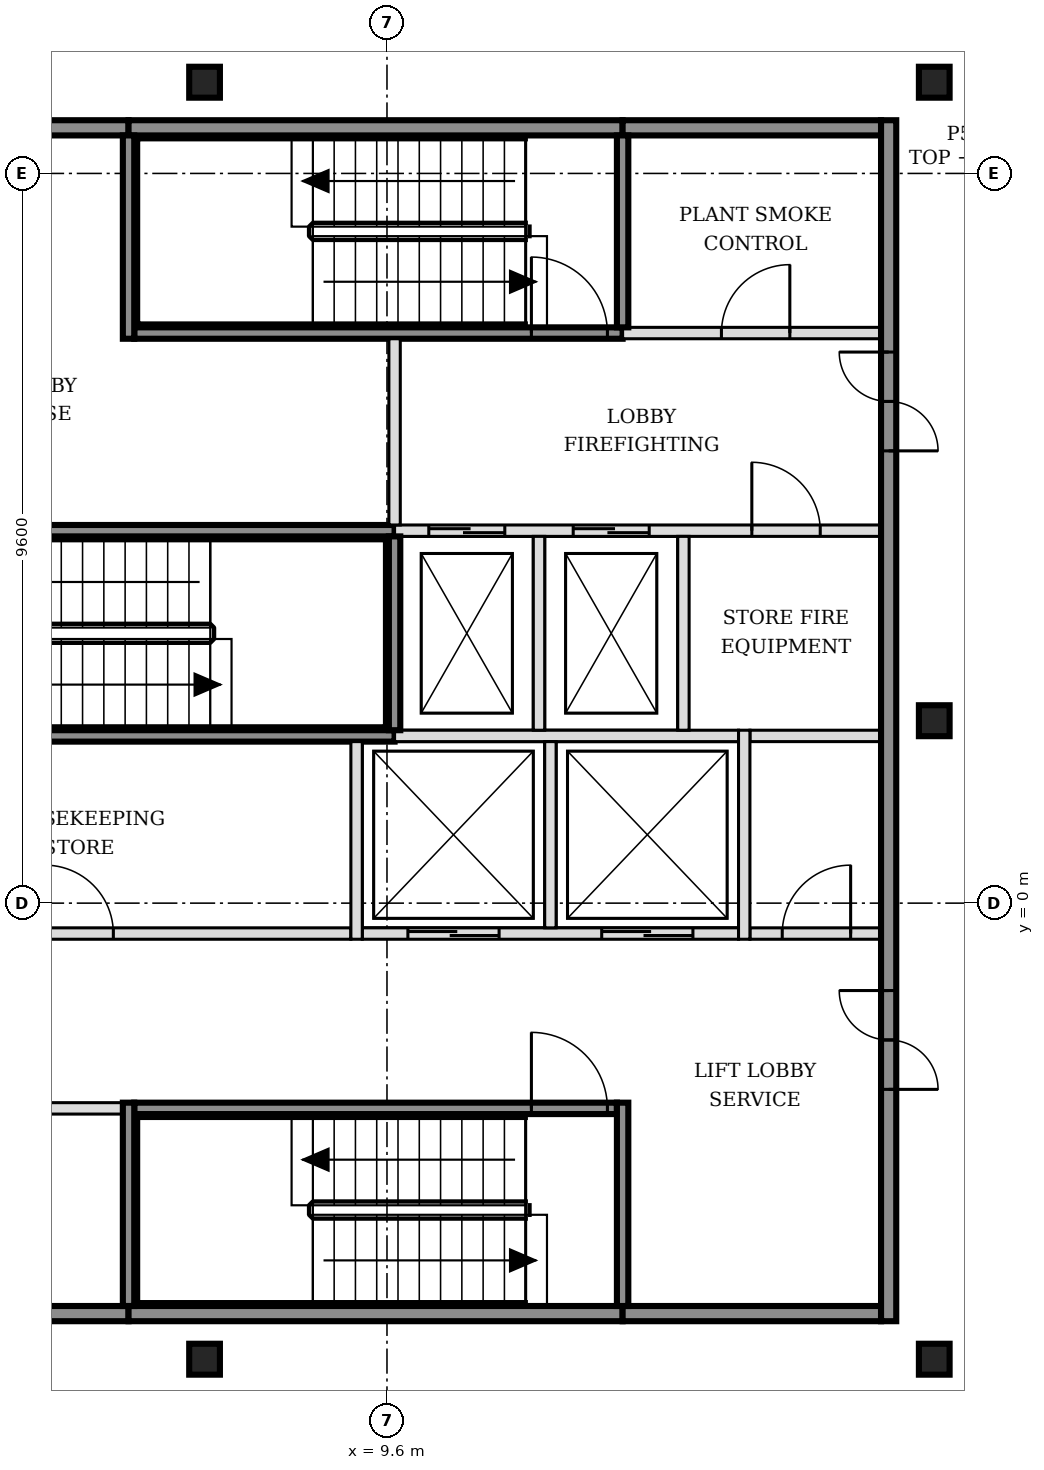
"""IFC4 building model, lengths in metres.
Left out: names, types, materials, properties, quantities, classifications, styles, units other than length and angle.
Written with IfcOpenShell. Run it as: python <this file> out.ifc"""

import sys

from ifc_helpers import new_model, si_unit, direction, frame, frame_2d, origin, origin_2d, place, context, subcontext, project, spatial, rectangle, i_section, extrude, element, fill, save


model = new_model("IFC4")
c1 = context("Model", 3, precision=1e-05, world=origin(), true_north=direction((0.0, 1.0)))
c2 = subcontext(c1, "Body", "Model", "MODEL_VIEW")
j1 = project(units=[si_unit("LENGTHUNIT", "METRE"), si_unit("PLANEANGLEUNIT", "RADIAN")], contexts=[c1])
p1 = place(None, origin())
s1 = spatial("IfcSite", under=j1, at=p1, CompositionType="ELEMENT")
p2 = place(p1, origin())
s2 = spatial("IfcBuilding", under=s1, at=p2, CompositionType="ELEMENT")
p3 = place(p2, frame((0.0, 0.0, 197.4)))
s3 = spatial("IfcBuildingStorey", under=s2, at=p3, CompositionType="ELEMENT", Elevation=197.4)
for number, where, z_axis, x_axis in (
    (1, (7.2, -6.0, -0.15), (0.0, 0.0, 1.0), (1.0, 0.0, 0.0)),
    (2, (16.8, -6.0, -0.15), (0.0, 0.0, 1.0), (1.0, 0.0, 0.0)),
    (3, (16.8, 2.4, -0.15), (0.0, 0.0, 1.0), (1.0, 0.0, 0.0)),
    (4, (7.2, 10.8, -0.15), (0.0, 0.0, 1.0), (1.0, 0.0, 0.0)),
    (5, (16.8, 10.8, -0.15), (0.0, 0.0, 1.0), (1.0, 0.0, 0.0)),
):
    element("IfcColumn", number, at=place(p3, frame(where, z_axis=z_axis, x_axis=x_axis)), inside=s3, PredefinedType="COLUMN", context=c2, shape_type="SweptSolid", body=[
        extrude(i_section(OverallWidth=0.404, OverallDepth=0.407, WebThickness=0.027, FlangeThickness=0.044, FilletRadius=0.015, at=origin_2d()), origin(), (0.0, 0.0, 1.0), 3.6),
    ])
p4 = place(p3, frame((-1.7, -5.4, 0.0), z_axis=(0.0, 0.0, 1.0), x_axis=(1.0, 0.0, 0.0)))
e6 = element("IfcWall", 6, at=p4, inside=s3, PredefinedType="SOLIDWALL", context=c2, shape_type="SweptSolid", body=[
    extrude(rectangle(XDim=7.9, YDim=0.2, at=frame_2d((3.95, 0.0))), origin(), (0.0, 0.0, 1.0), 3.45),
])
p5 = place(p3, frame((6.2, -5.4, 0.0), z_axis=(0.0, 0.0, 1.0), x_axis=(1.0, 0.0, 0.0)))
e7 = element("IfcWall", 7, at=p5, inside=s3, PredefinedType="SOLIDWALL", context=c2, shape_type="SweptSolid", body=[
    extrude(rectangle(XDim=6.5, YDim=0.2, at=frame_2d((3.25, 0.0))), origin(), (0.0, 0.0, 1.0), 3.45),
])
p6 = place(p3, frame((12.7, -5.4, 0.0), z_axis=(0.0, 0.0, 1.0), x_axis=(1.0, 0.0, 0.0)))
e8 = element("IfcWall", 8, at=p6, inside=s3, PredefinedType="SOLIDWALL", context=c2, shape_type="SweptSolid", body=[
    extrude(rectangle(XDim=3.4, YDim=0.2, at=frame_2d((1.7, 0.0))), origin(), (0.0, 0.0, 1.0), 3.45),
])
p7 = place(p3, frame((-1.7, -2.7, 0.0), z_axis=(0.0, 0.0, 1.0), x_axis=(1.0, 0.0, 0.0)))
e9 = element("IfcWall", 9, at=p7, inside=s3, PredefinedType="PARTITIONING", context=c2, shape_type="SweptSolid", body=[
    extrude(rectangle(XDim=7.825, YDim=0.15, at=frame_2d((3.913, 0.0))), origin(), (0.0, 0.0, 1.0), 3.45),
])
p8 = place(p7, frame((3.45, 0.0, 0.0)))
e10 = element("IfcOpeningElement", 10, at=p8, cuts=e9, PredefinedType="OPENING", context=c2, shape_type="SweptSolid", body=[
    extrude(rectangle(XDim=0.9, YDim=2.1, at=frame_2d((0.45, 1.05))), frame((0.0, 0.085, 0.0), z_axis=(0.0, -1.0, 0.0), x_axis=(1.0, 0.0, 0.0)), (0.0, 0.0, 1.0), 0.17),
])
p9 = place(p3, frame((6.275, -2.7, 0.0), z_axis=(0.0, 0.0, 1.0), x_axis=(1.0, 0.0, 0.0)))
e11 = element("IfcWall", 11, at=p9, inside=s3, PredefinedType="SOLIDWALL", context=c2, shape_type="SweptSolid", body=[
    extrude(rectangle(XDim=6.35, YDim=0.15, at=frame_2d((3.175, 0.0))), origin(), (0.0, 0.0, 1.0), 3.45),
])
p10 = place(p9, frame((5.225, 0.0, 0.0)))
e12 = element("IfcOpeningElement", 12, at=p10, cuts=e11, PredefinedType="OPENING", context=c2, shape_type="SweptSolid", body=[
    extrude(rectangle(XDim=1.0, YDim=2.1, at=frame_2d((0.5, 1.05))), frame((0.0, 0.085, 0.0), z_axis=(0.0, -1.0, 0.0), x_axis=(1.0, 0.0, 0.0)), (0.0, 0.0, 1.0), 0.17),
])
p11 = place(p3, frame((-1.7, -0.4, 0.0), z_axis=(0.0, 0.0, 1.0), x_axis=(1.0, 0.0, 0.0)))
e13 = element("IfcWall", 13, at=p11, inside=s3, PredefinedType="PARTITIONING", context=c2, shape_type="SweptSolid", body=[
    extrude(rectangle(XDim=10.825, YDim=0.15, at=frame_2d((5.413, 0.0))), origin(), (0.0, 0.0, 1.0), 3.45),
])
p12 = place(p11, frame((1.3, 0.0, 0.0)))
e14 = element("IfcOpeningElement", 14, at=p12, cuts=e13, PredefinedType="OPENING", context=c2, shape_type="SweptSolid", body=[
    extrude(rectangle(XDim=0.9, YDim=2.1, at=frame_2d((0.45, 1.05))), frame((0.0, 0.085, 0.0), z_axis=(0.0, -1.0, 0.0), x_axis=(1.0, 0.0, 0.0)), (0.0, 0.0, 1.0), 0.17),
])
p13 = place(p11, frame((6.8, 0.0, 0.0)))
e15 = element("IfcOpeningElement", 15, at=p13, cuts=e13, PredefinedType="OPENING", context=c2, shape_type="SweptSolid", body=[
    extrude(rectangle(XDim=0.9, YDim=2.1, at=frame_2d((0.45, 1.05))), frame((0.0, 0.085, 0.0), z_axis=(0.0, -1.0, 0.0), x_axis=(1.0, 0.0, 0.0)), (0.0, 0.0, 1.0), 0.17),
])
p14 = place(p3, frame((9.275, -0.4, 0.0), z_axis=(0.0, 0.0, 1.0), x_axis=(1.0, 0.0, 0.0)))
e16 = element("IfcWall", 16, at=p14, inside=s3, PredefinedType="SOLIDWALL", context=c2, shape_type="SweptSolid", body=[
    extrude(rectangle(XDim=4.95, YDim=0.15, at=frame_2d((2.475, 0.0))), origin(), (0.0, 0.0, 1.0), 3.45),
])
p15 = place(p14, frame((0.6, 0.0, 0.0)))
e17 = element("IfcOpeningElement", 17, at=p15, cuts=e16, PredefinedType="OPENING", context=c2, shape_type="SweptSolid", body=[
    extrude(rectangle(XDim=1.2, YDim=2.1, at=frame_2d((0.6, 1.05))), frame((0.0, 0.085, 0.0), z_axis=(0.0, -1.0, 0.0), x_axis=(1.0, 0.0, 0.0)), (0.0, 0.0, 1.0), 0.17),
])
p16 = place(p14, frame((3.15, 0.0, 0.0)))
e18 = element("IfcOpeningElement", 18, at=p16, cuts=e16, PredefinedType="OPENING", context=c2, shape_type="SweptSolid", body=[
    extrude(rectangle(XDim=1.2, YDim=2.1, at=frame_2d((0.6, 1.05))), frame((0.0, 0.085, 0.0), z_axis=(0.0, -1.0, 0.0), x_axis=(1.0, 0.0, 0.0)), (0.0, 0.0, 1.0), 0.17),
])
p17 = place(p3, frame((14.375, -0.4, 0.0), z_axis=(0.0, 0.0, 1.0), x_axis=(1.0, 0.0, 0.0)))
e19 = element("IfcWall", 19, at=p17, inside=s3, PredefinedType="PARTITIONING", context=c2, shape_type="SweptSolid", body=[
    extrude(rectangle(XDim=1.725, YDim=0.15, at=frame_2d((0.863, 0.0))), origin(), (0.0, 0.0, 1.0), 3.45),
])
p18 = place(p17, frame((0.425, 0.0, 0.0)))
e20 = element("IfcOpeningElement", 20, at=p18, cuts=e19, PredefinedType="OPENING", context=c2, shape_type="SweptSolid", body=[
    extrude(rectangle(XDim=0.9, YDim=2.1, at=frame_2d((0.45, 1.05))), frame((0.0, 0.085, 0.0), z_axis=(0.0, -1.0, 0.0), x_axis=(1.0, 0.0, 0.0)), (0.0, 0.0, 1.0), 0.17),
])
p19 = place(p3, frame((3.2, 2.2, 0.0), z_axis=(0.0, 0.0, 1.0), x_axis=(1.0, 0.0, 0.0)))
e21 = element("IfcWall", 21, at=p19, inside=s3, PredefinedType="SOLIDWALL", context=c2, shape_type="SweptSolid", body=[
    extrude(rectangle(XDim=6.5, YDim=0.15, at=frame_2d((3.25, 0.0))), origin(), (0.0, 0.0, 1.0), 3.45),
])
p20 = place(p3, frame((9.7, 2.2, 0.0), z_axis=(0.0, 0.0, 1.0), x_axis=(1.0, 0.0, 0.0)))
e22 = element("IfcWall", 22, at=p20, inside=s3, PredefinedType="SOLIDWALL", context=c2, shape_type="SweptSolid", body=[
    extrude(rectangle(XDim=4.525, YDim=0.15, at=frame_2d((2.263, 0.0))), origin(), (0.0, 0.0, 1.0), 3.45),
])
p21 = place(p3, frame((14.375, 2.2, 0.0), z_axis=(0.0, 0.0, 1.0), x_axis=(1.0, 0.0, 0.0)))
e23 = element("IfcWall", 23, at=p21, inside=s3, PredefinedType="PARTITIONING", context=c2, shape_type="SweptSolid", body=[
    extrude(rectangle(XDim=1.725, YDim=0.15, at=frame_2d((0.863, 0.0))), origin(), (0.0, 0.0, 1.0), 3.45),
])
p22 = place(p3, frame((3.2, 4.9, 0.0), z_axis=(0.0, 0.0, 1.0), x_axis=(1.0, 0.0, 0.0)))
e24 = element("IfcWall", 24, at=p22, inside=s3, PredefinedType="SOLIDWALL", context=c2, shape_type="SweptSolid", body=[
    extrude(rectangle(XDim=6.5, YDim=0.15, at=frame_2d((3.25, 0.0))), origin(), (0.0, 0.0, 1.0), 3.45),
])
p23 = place(p22, frame((0.175, 0.0, 0.0)))
e25 = element("IfcOpeningElement", 25, at=p23, cuts=e24, PredefinedType="OPENING", context=c2, shape_type="SweptSolid", body=[
    extrude(rectangle(XDim=1.0, YDim=2.1, at=frame_2d((0.5, 1.05))), frame((0.0, 0.085, 0.0), z_axis=(0.0, -1.0, 0.0), x_axis=(1.0, 0.0, 0.0)), (0.0, 0.0, 1.0), 0.17),
])
p24 = place(p3, frame((9.7, 4.9, 0.0), z_axis=(0.0, 0.0, 1.0), x_axis=(1.0, 0.0, 0.0)))
e26 = element("IfcWall", 26, at=p24, inside=s3, PredefinedType="SOLIDWALL", context=c2, shape_type="SweptSolid", body=[
    extrude(rectangle(XDim=6.4, YDim=0.15, at=frame_2d((3.2, 0.0))), origin(), (0.0, 0.0, 1.0), 3.45),
])
p25 = place(p24, frame((0.45, 0.0, 0.0)))
e27 = element("IfcOpeningElement", 27, at=p25, cuts=e26, PredefinedType="OPENING", context=c2, shape_type="SweptSolid", body=[
    extrude(rectangle(XDim=1.0, YDim=2.1, at=frame_2d((0.5, 1.05))), frame((0.0, 0.085, 0.0), z_axis=(0.0, -1.0, 0.0), x_axis=(1.0, 0.0, 0.0)), (0.0, 0.0, 1.0), 0.17),
])
p26 = place(p24, frame((2.35, 0.0, 0.0)))
e28 = element("IfcOpeningElement", 28, at=p26, cuts=e26, PredefinedType="OPENING", context=c2, shape_type="SweptSolid", body=[
    extrude(rectangle(XDim=1.0, YDim=2.1, at=frame_2d((0.5, 1.05))), frame((0.0, 0.085, 0.0), z_axis=(0.0, -1.0, 0.0), x_axis=(1.0, 0.0, 0.0)), (0.0, 0.0, 1.0), 0.17),
])
p27 = place(p24, frame((4.7, 0.0, 0.0)))
e29 = element("IfcOpeningElement", 29, at=p27, cuts=e26, PredefinedType="OPENING", context=c2, shape_type="SweptSolid", body=[
    extrude(rectangle(XDim=0.9, YDim=2.1, at=frame_2d((0.45, 1.05))), frame((0.0, 0.085, 0.0), z_axis=(0.0, -1.0, 0.0), x_axis=(1.0, 0.0, 0.0)), (0.0, 0.0, 1.0), 0.17),
])
p28 = place(p3, frame((6.275, 7.5, 0.0), z_axis=(0.0, 0.0, 1.0), x_axis=(1.0, 0.0, 0.0)))
e30 = element("IfcWall", 30, at=p28, inside=s3, PredefinedType="SOLIDWALL", context=c2, shape_type="SweptSolid", body=[
    extrude(rectangle(XDim=6.425, YDim=0.15, at=frame_2d((3.212, 0.0))), origin(), (0.0, 0.0, 1.0), 3.45),
])
p29 = place(p28, frame((5.225, 0.0, 0.0)))
e31 = element("IfcOpeningElement", 31, at=p29, cuts=e30, PredefinedType="OPENING", context=c2, shape_type="SweptSolid", body=[
    extrude(rectangle(XDim=1.0, YDim=2.1, at=frame_2d((0.5, 1.05))), frame((0.0, 0.085, 0.0), z_axis=(0.0, -1.0, 0.0), x_axis=(1.0, 0.0, 0.0)), (0.0, 0.0, 1.0), 0.17),
])
p30 = place(p3, frame((12.7, 7.5, 0.0), z_axis=(0.0, 0.0, 1.0), x_axis=(1.0, 0.0, 0.0)))
e32 = element("IfcWall", 32, at=p30, inside=s3, PredefinedType="SOLIDWALL", context=c2, shape_type="SweptSolid", body=[
    extrude(rectangle(XDim=3.4, YDim=0.15, at=frame_2d((1.7, 0.0))), origin(), (0.0, 0.0, 1.0), 3.45),
])
p31 = place(p30, frame((1.3, 0.0, 0.0)))
e33 = element("IfcOpeningElement", 33, at=p31, cuts=e32, PredefinedType="OPENING", context=c2, shape_type="SweptSolid", body=[
    extrude(rectangle(XDim=0.9, YDim=2.1, at=frame_2d((0.45, 1.05))), frame((0.0, 0.085, 0.0), z_axis=(0.0, -1.0, 0.0), x_axis=(1.0, 0.0, 0.0)), (0.0, 0.0, 1.0), 0.17),
])
p32 = place(p3, frame((-1.7, 10.2, 0.0), z_axis=(0.0, 0.0, 1.0), x_axis=(1.0, 0.0, 0.0)))
e34 = element("IfcWall", 34, at=p32, inside=s3, PredefinedType="SOLIDWALL", context=c2, shape_type="SweptSolid", body=[
    extrude(rectangle(XDim=7.9, YDim=0.2, at=frame_2d((3.95, 0.0))), origin(), (0.0, 0.0, 1.0), 3.45),
])
p33 = place(p3, frame((6.2, 10.2, 0.0), z_axis=(0.0, 0.0, 1.0), x_axis=(1.0, 0.0, 0.0)))
e35 = element("IfcWall", 35, at=p33, inside=s3, PredefinedType="SOLIDWALL", context=c2, shape_type="SweptSolid", body=[
    extrude(rectangle(XDim=6.5, YDim=0.2, at=frame_2d((3.25, 0.0))), origin(), (0.0, 0.0, 1.0), 3.45),
])
p34 = place(p3, frame((12.7, 10.2, 0.0), z_axis=(0.0, 0.0, 1.0), x_axis=(1.0, 0.0, 0.0)))
e36 = element("IfcWall", 36, at=p34, inside=s3, PredefinedType="SOLIDWALL", context=c2, shape_type="SweptSolid", body=[
    extrude(rectangle(XDim=3.4, YDim=0.2, at=frame_2d((1.7, 0.0))), origin(), (0.0, 0.0, 1.0), 3.45),
])
for number, where, z_axis, x_axis in (
    (37, (6.2, -5.3, 0.0), (0.0, 0.0, 1.0), (0.0, 1.0, 0.0)),
    (38, (6.2, 7.425, 0.0), (0.0, 0.0, 1.0), (0.0, 1.0, 0.0)),
):
    element("IfcWall", number, at=place(p3, frame(where, z_axis=z_axis, x_axis=x_axis)), inside=s3, PredefinedType="SOLIDWALL", context=c2, shape_type="SweptSolid", body=[
        extrude(rectangle(XDim=2.675, YDim=0.15, at=frame_2d((1.337, 0.0))), origin(), (0.0, 0.0, 1.0), 3.45),
    ])
p35 = place(p3, frame((9.2, -0.475, 0.0), z_axis=(0.0, 0.0, 1.0), x_axis=(0.0, 1.0, 0.0)))
e39 = element("IfcWall", 39, at=p35, inside=s3, PredefinedType="SOLIDWALL", context=c2, shape_type="SweptSolid", body=[
    extrude(rectangle(XDim=2.6, YDim=0.15, at=frame_2d((1.3, 0.0))), origin(), (0.0, 0.0, 1.0), 3.45),
])
p36 = place(p3, frame((9.7, 2.275, 0.0), z_axis=(0.0, 0.0, 1.0), x_axis=(0.0, 1.0, 0.0)))
e40 = element("IfcWall", 40, at=p36, inside=s3, PredefinedType="SOLIDWALL", context=c2, shape_type="SweptSolid", body=[
    extrude(rectangle(XDim=2.55, YDim=0.15, at=frame_2d((1.275, 0.0))), origin(), (0.0, 0.0, 1.0), 3.45),
])
p37 = place(p3, frame((9.7, 4.975, 0.0), z_axis=(0.0, 0.0, 1.0), x_axis=(0.0, 1.0, 0.0)))
e41 = element("IfcWall", 41, at=p37, inside=s3, PredefinedType="SOLIDWALL", context=c2, shape_type="SweptSolid", body=[
    extrude(rectangle(XDim=2.45, YDim=0.15, at=frame_2d((1.225, 0.0))), origin(), (0.0, 0.0, 1.0), 3.45),
])
p38 = place(p3, frame((11.6, 2.275, 0.0), z_axis=(0.0, 0.0, 1.0), x_axis=(0.0, 1.0, 0.0)))
e42 = element("IfcWall", 42, at=p38, inside=s3, PredefinedType="SOLIDWALL", context=c2, shape_type="SweptSolid", body=[
    extrude(rectangle(XDim=2.55, YDim=0.15, at=frame_2d((1.275, 0.0))), origin(), (0.0, 0.0, 1.0), 3.45),
])
p39 = place(p3, frame((11.75, -0.325, 0.0), z_axis=(0.0, 0.0, 1.0), x_axis=(0.0, 1.0, 0.0)))
e43 = element("IfcWall", 43, at=p39, inside=s3, PredefinedType="SOLIDWALL", context=c2, shape_type="SweptSolid", body=[
    extrude(rectangle(XDim=2.45, YDim=0.15, at=frame_2d((1.225, 0.0))), origin(), (0.0, 0.0, 1.0), 3.45),
])
p40 = place(p3, frame((12.7, -5.3, 0.0), z_axis=(0.0, 0.0, 1.0), x_axis=(0.0, 1.0, 0.0)))
e44 = element("IfcWall", 44, at=p40, inside=s3, PredefinedType="SOLIDWALL", context=c2, shape_type="SweptSolid", body=[
    extrude(rectangle(XDim=2.675, YDim=0.15, at=frame_2d((1.337, 0.0))), origin(), (0.0, 0.0, 1.0), 3.45),
])
p41 = place(p3, frame((12.7, 7.575, 0.0), z_axis=(0.0, 0.0, 1.0), x_axis=(0.0, 1.0, 0.0)))
e45 = element("IfcWall", 45, at=p41, inside=s3, PredefinedType="SOLIDWALL", context=c2, shape_type="SweptSolid", body=[
    extrude(rectangle(XDim=2.525, YDim=0.15, at=frame_2d((1.263, 0.0))), origin(), (0.0, 0.0, 1.0), 3.45),
])
p42 = place(p3, frame((13.5, 2.275, 0.0), z_axis=(0.0, 0.0, 1.0), x_axis=(0.0, 1.0, 0.0)))
e46 = element("IfcWall", 46, at=p42, inside=s3, PredefinedType="SOLIDWALL", context=c2, shape_type="SweptSolid", body=[
    extrude(rectangle(XDim=2.55, YDim=0.15, at=frame_2d((1.275, 0.0))), origin(), (0.0, 0.0, 1.0), 3.45),
])
p43 = place(p3, frame((14.3, -0.475, 0.0), z_axis=(0.0, 0.0, 1.0), x_axis=(0.0, 1.0, 0.0)))
e47 = element("IfcWall", 47, at=p43, inside=s3, PredefinedType="SOLIDWALL", context=c2, shape_type="SweptSolid", body=[
    extrude(rectangle(XDim=2.75, YDim=0.15, at=frame_2d((1.375, 0.0))), origin(), (0.0, 0.0, 1.0), 3.45),
])
p44 = place(p3, frame((16.2, -5.5, 0.0), z_axis=(0.0, 0.0, 1.0), x_axis=(0.0, 1.0, 0.0)))
e48 = element("IfcWall", 48, at=p44, inside=s3, PredefinedType="SOLIDWALL", context=c2, shape_type="SweptSolid", body=[
    extrude(rectangle(XDim=15.8, YDim=0.2, at=frame_2d((7.9, 0.0))), origin(), (0.0, 0.0, 1.0), 3.45),
])
p45 = place(p44, frame((3.05, 0.0, 0.0)))
e49 = element("IfcOpeningElement", 49, at=p45, cuts=e48, PredefinedType="OPENING", context=c2, shape_type="SweptSolid", body=[
    extrude(rectangle(XDim=1.3, YDim=2.1, at=frame_2d((0.65, 1.05))), frame((0.0, 0.11, 0.0), z_axis=(0.0, -1.0, 0.0), x_axis=(1.0, 0.0, 0.0)), (0.0, 0.0, 1.0), 0.22),
])
p46 = place(p44, frame((11.45, 0.0, 0.0)))
e50 = element("IfcOpeningElement", 50, at=p46, cuts=e48, PredefinedType="OPENING", context=c2, shape_type="SweptSolid", body=[
    extrude(rectangle(XDim=1.3, YDim=2.1, at=frame_2d((0.65, 1.05))), frame((0.0, 0.11, 0.0), z_axis=(0.0, -1.0, 0.0), x_axis=(1.0, 0.0, 0.0)), (0.0, 0.0, 1.0), 0.22),
])
p47 = place(p15, origin())
e51 = element("IfcDoor", 51, at=p47, inside=s3, OperationType="DOUBLE_DOOR_SLIDING", PredefinedType="DOOR", context=c2, shape_type="SweptSolid", body=[
    extrude(rectangle(XDim=1.2, YDim=2.1, at=frame_2d((0.6, 1.05))), frame((0.0, 0.025, 0.0), z_axis=(0.0, -1.0, 0.0), x_axis=(1.0, 0.0, 0.0)), (0.0, 0.0, 1.0), 0.05),
])
fill(e17, e51)
p48 = place(p16, origin())
e52 = element("IfcDoor", 52, at=p48, inside=s3, OperationType="DOUBLE_DOOR_SLIDING", PredefinedType="DOOR", context=c2, shape_type="SweptSolid", body=[
    extrude(rectangle(XDim=1.2, YDim=2.1, at=frame_2d((0.6, 1.05))), frame((0.0, 0.025, 0.0), z_axis=(0.0, -1.0, 0.0), x_axis=(1.0, 0.0, 0.0)), (0.0, 0.0, 1.0), 0.05),
])
fill(e18, e52)
p49 = place(p25, origin())
e53 = element("IfcDoor", 53, at=p49, inside=s3, OperationType="DOUBLE_DOOR_SLIDING", PredefinedType="DOOR", context=c2, shape_type="SweptSolid", body=[
    extrude(rectangle(XDim=1.0, YDim=2.1, at=frame_2d((0.5, 1.05))), frame((0.0, 0.025, 0.0), z_axis=(0.0, -1.0, 0.0), x_axis=(1.0, 0.0, 0.0)), (0.0, 0.0, 1.0), 0.05),
])
fill(e27, e53)
p50 = place(p26, origin())
e54 = element("IfcDoor", 54, at=p50, inside=s3, OperationType="DOUBLE_DOOR_SLIDING", PredefinedType="DOOR", context=c2, shape_type="SweptSolid", body=[
    extrude(rectangle(XDim=1.0, YDim=2.1, at=frame_2d((0.5, 1.05))), frame((0.0, 0.025, 0.0), z_axis=(0.0, -1.0, 0.0), x_axis=(1.0, 0.0, 0.0)), (0.0, 0.0, 1.0), 0.05),
])
fill(e28, e54)
p51 = place(p10, origin())
e55 = element("IfcDoor", 55, at=p51, inside=s3, OperationType="SINGLE_SWING_LEFT", PredefinedType="DOOR", context=c2, shape_type="SweptSolid", body=[
    extrude(rectangle(XDim=1.0, YDim=2.1, at=frame_2d((0.5, 1.05))), frame((0.0, 0.025, 0.0), z_axis=(0.0, -1.0, 0.0), x_axis=(1.0, 0.0, 0.0)), (0.0, 0.0, 1.0), 0.05),
])
fill(e12, e55)
p52 = place(p29, origin())
e56 = element("IfcDoor", 56, at=p52, inside=s3, OperationType="SINGLE_SWING_LEFT", PredefinedType="DOOR", context=c2, shape_type="SweptSolid", body=[
    extrude(rectangle(XDim=1.0, YDim=2.1, at=frame_2d((0.5, 1.05))), frame((0.0, 0.025, 0.0), z_axis=(0.0, -1.0, 0.0), x_axis=(1.0, 0.0, 0.0)), (0.0, 0.0, 1.0), 0.05),
])
fill(e31, e56)
p53 = place(p45, origin())
e57 = element("IfcDoor", 57, at=p53, inside=s3, OperationType="DOUBLE_DOOR_SINGLE_SWING", PredefinedType="DOOR", context=c2, shape_type="SweptSolid", body=[
    extrude(rectangle(XDim=1.3, YDim=2.1, at=frame_2d((0.65, 1.05))), frame((0.0, 0.025, 0.0), z_axis=(0.0, -1.0, 0.0), x_axis=(1.0, 0.0, 0.0)), (0.0, 0.0, 1.0), 0.05),
])
fill(e49, e57)
p54 = place(p46, origin())
e58 = element("IfcDoor", 58, at=p54, inside=s3, OperationType="DOUBLE_DOOR_SINGLE_SWING", PredefinedType="DOOR", context=c2, shape_type="SweptSolid", body=[
    extrude(rectangle(XDim=1.3, YDim=2.1, at=frame_2d((0.65, 1.05))), frame((0.0, 0.025, 0.0), z_axis=(0.0, -1.0, 0.0), x_axis=(1.0, 0.0, 0.0)), (0.0, 0.0, 1.0), 0.05),
])
fill(e50, e58)
p55 = place(p18, origin())
e59 = element("IfcDoor", 59, at=p55, inside=s3, OperationType="SINGLE_SWING_RIGHT", PredefinedType="DOOR", context=c2, shape_type="SweptSolid", body=[
    extrude(rectangle(XDim=0.9, YDim=2.1, at=frame_2d((0.45, 1.05))), frame((0.0, 0.025, 0.0), z_axis=(0.0, -1.0, 0.0), x_axis=(1.0, 0.0, 0.0)), (0.0, 0.0, 1.0), 0.05),
])
fill(e20, e59)
p56 = place(p27, origin())
e60 = element("IfcDoor", 60, at=p56, inside=s3, OperationType="SINGLE_SWING_LEFT", PredefinedType="DOOR", context=c2, shape_type="SweptSolid", body=[
    extrude(rectangle(XDim=0.9, YDim=2.1, at=frame_2d((0.45, 1.05))), frame((0.0, 0.025, 0.0), z_axis=(0.0, -1.0, 0.0), x_axis=(1.0, 0.0, 0.0)), (0.0, 0.0, 1.0), 0.05),
])
fill(e29, e60)
p57 = place(p31, origin())
e61 = element("IfcDoor", 61, at=p57, inside=s3, OperationType="SINGLE_SWING_RIGHT", PredefinedType="DOOR", context=c2, shape_type="SweptSolid", body=[
    extrude(rectangle(XDim=0.9, YDim=2.1, at=frame_2d((0.45, 1.05))), frame((0.0, 0.025, 0.0), z_axis=(0.0, -1.0, 0.0), x_axis=(1.0, 0.0, 0.0)), (0.0, 0.0, 1.0), 0.05),
])
fill(e33, e61)
p58 = place(p13, origin())
e62 = element("IfcDoor", 62, at=p58, inside=s3, OperationType="SINGLE_SWING_LEFT", PredefinedType="DOOR", context=c2, shape_type="SweptSolid", body=[
    extrude(rectangle(XDim=0.9, YDim=2.1, at=frame_2d((0.45, 1.05))), frame((0.0, 0.025, 0.0), z_axis=(0.0, -1.0, 0.0), x_axis=(1.0, 0.0, 0.0)), (0.0, 0.0, 1.0), 0.05),
])
fill(e15, e62)
save(model, sys.argv[1])
